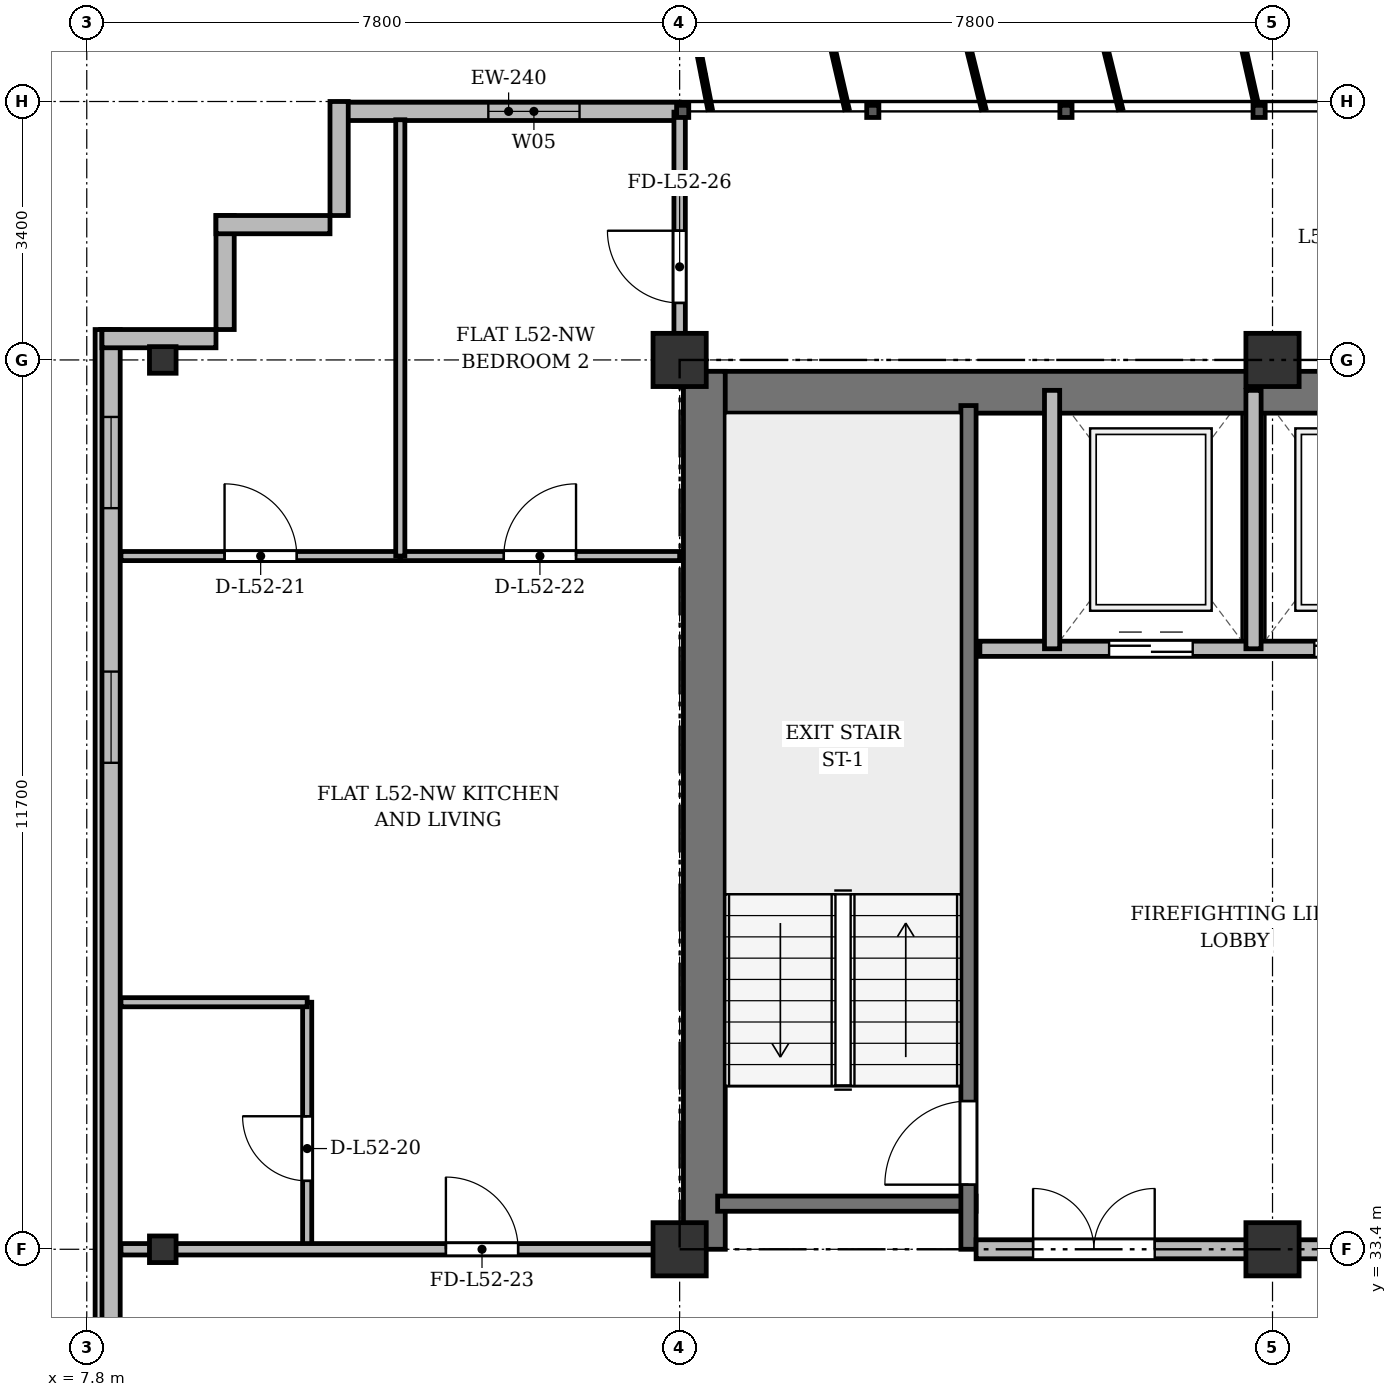
"""IFC4 building model, lengths in metres.
Left out: names, types, materials, properties, quantities, classifications, styles, units other than length and angle.
Written with IfcOpenShell. Run it as: python <this file> out.ifc"""

import sys

from ifc_helpers import new_model, si_unit, direction, frame, frame_2d, origin, origin_2d, place, context, subcontext, project, spatial, rectangle, i_section, extrude, source, transform, mapped, element, fill, save


model = new_model("IFC4")
c1 = context("Model", 3, precision=1e-05, world=origin(), true_north=direction((0.0, 1.0)))
c2 = subcontext(c1, "Body", "Model", "MODEL_VIEW")
j1 = project(units=[si_unit("LENGTHUNIT", "METRE"), si_unit("PLANEANGLEUNIT", "RADIAN")], contexts=[c1])
p1 = place(None, origin())
s1 = spatial("IfcSite", under=j1, at=p1, CompositionType="ELEMENT")
p2 = place(p1, origin())
s2 = spatial("IfcBuilding", under=s1, at=p2, CompositionType="ELEMENT")
p3 = place(p2, frame((0.0, 0.0, 201.3)))
s3 = spatial("IfcBuildingStorey", under=s2, at=p3, CompositionType="ELEMENT", Elevation=201.3)
m1 = source(origin(), c2, "Body", "SweptSolid", [
    extrude(i_section(OverallWidth=0.35, OverallDepth=0.35, WebThickness=0.018, FlangeThickness=0.028, at=origin_2d()), origin(), (0.0, 0.0, 1.0), 3.6),
])
for number, where, z_axis, x_axis in (
    (1, (8.8, 33.4, 0.0), (0.0, 0.0, 1.0), (1.0, 0.0, 0.0)),
    (2, (8.8, 45.1, 0.0), (0.0, 0.0, 1.0), (1.0, 0.0, 0.0)),
):
    element("IfcColumn", number, at=place(p3, frame(where, z_axis=z_axis, x_axis=x_axis)), inside=s3, PredefinedType="COLUMN", context=c2, shape_type="MappedRepresentation", body=[
        mapped(m1, transform((0.0, 0.0, 0.0), x_axis=(1.0, 0.0, 0.0), y_axis=(0.0, 1.0, 0.0), z_axis=(0.0, 0.0, 1.0), scale=1.0)),
    ])
m2 = source(origin(), c2, "Body", "SweptSolid", [
    extrude(rectangle(XDim=0.7, YDim=0.7, at=origin_2d()), origin(), (0.0, 0.0, 1.0), 3.6),
])
for number, where, z_axis, x_axis in (
    (3, (15.6, 33.4, 0.0), (0.0, 0.0, 1.0), (1.0, 0.0, 0.0)),
    (4, (15.6, 45.1, 0.0), (0.0, 0.0, 1.0), (1.0, 0.0, 0.0)),
    (5, (23.4, 33.4, 0.0), (0.0, 0.0, 1.0), (1.0, 0.0, 0.0)),
    (6, (23.4, 45.1, 0.0), (0.0, 0.0, 1.0), (1.0, 0.0, 0.0)),
):
    element("IfcColumn", number, at=place(p3, frame(where, z_axis=z_axis, x_axis=x_axis)), inside=s3, PredefinedType="COLUMN", context=c2, shape_type="MappedRepresentation", body=[
        mapped(m2, transform((0.0, 0.0, 0.0), x_axis=(1.0, 0.0, 0.0), y_axis=(0.0, 1.0, 0.0), z_axis=(0.0, 0.0, 1.0), scale=1.0)),
    ])
p4 = place(p3, frame((11.1, 48.37, 0.0), z_axis=(0.0, 0.0, 1.0), x_axis=(1.0, 0.0, 0.0)))
e7 = element("IfcWall", 7, at=p4, inside=s3, PredefinedType="SOLIDWALL", context=c2, shape_type="SweptSolid", body=[
    extrude(rectangle(XDim=4.5, YDim=0.24, at=frame_2d((2.25, 0.0))), origin(), (0.0, 0.0, 1.0), 3.22),
])
p5 = place(p4, frame((1.983, 0.0, 0.9)))
e8 = element("IfcOpeningElement", 8, at=p5, cuts=e7, PredefinedType="OPENING", context=c2, shape_type="SweptSolid", body=[
    extrude(rectangle(XDim=1.2, YDim=1.65, at=frame_2d((0.6, 0.825))), frame((0.0, 0.13, 0.0), z_axis=(0.0, -1.0, 0.0), x_axis=(1.0, 0.0, 0.0)), (0.0, 0.0, 1.0), 0.26),
])
p6 = place(p3, frame((8.12, 6.4, 0.0), z_axis=(0.0, 0.0, 1.0), x_axis=(0.0, 1.0, 0.0)))
e9 = element("IfcWall", 9, at=p6, inside=s3, PredefinedType="SOLIDWALL", context=c2, shape_type="SweptSolid", body=[
    extrude(rectangle(XDim=39.1, YDim=0.24, at=frame_2d((19.55, 0.0))), origin(), (0.0, 0.0, 1.0), 3.22),
])
p7 = place(p6, frame((1.45, 0.0, 0.92)))
e10 = element("IfcOpeningElement", 10, at=p7, cuts=e9, PredefinedType="OPENING", context=c2, shape_type="SweptSolid", body=[
    extrude(rectangle(XDim=1.2, YDim=1.65, at=frame_2d((0.6, 0.825))), frame((0.0, 0.13, 0.0), z_axis=(0.0, -1.0, 0.0), x_axis=(1.0, 0.0, 0.0)), (0.0, 0.0, 1.0), 0.26),
])
p8 = place(p6, frame((3.7, 0.0, 0.92)))
e11 = element("IfcOpeningElement", 11, at=p8, cuts=e9, PredefinedType="OPENING", context=c2, shape_type="SweptSolid", body=[
    extrude(rectangle(XDim=2.6, YDim=1.9, at=frame_2d((1.3, 0.95))), frame((0.0, 0.13, 0.0), z_axis=(0.0, -1.0, 0.0), x_axis=(1.0, 0.0, 0.0)), (0.0, 0.0, 1.0), 0.26),
])
p9 = place(p6, frame((7.9, 0.0, 0.92)))
e12 = element("IfcOpeningElement", 12, at=p9, cuts=e9, PredefinedType="OPENING", context=c2, shape_type="SweptSolid", body=[
    extrude(rectangle(XDim=2.6, YDim=1.9, at=frame_2d((1.3, 0.95))), frame((0.0, 0.13, 0.0), z_axis=(0.0, -1.0, 0.0), x_axis=(1.0, 0.0, 0.0)), (0.0, 0.0, 1.0), 0.26),
])
p10 = place(p6, frame((15.1, 0.0, 0.92)))
e13 = element("IfcOpeningElement", 13, at=p10, cuts=e9, PredefinedType="OPENING", context=c2, shape_type="SweptSolid", body=[
    extrude(rectangle(XDim=2.6, YDim=1.9, at=frame_2d((1.3, 0.95))), frame((0.0, 0.13, 0.0), z_axis=(0.0, -1.0, 0.0), x_axis=(1.0, 0.0, 0.0)), (0.0, 0.0, 1.0), 0.26),
])
p11 = place(p6, frame((33.4, 0.0, 0.92)))
e14 = element("IfcOpeningElement", 14, at=p11, cuts=e9, PredefinedType="OPENING", context=c2, shape_type="SweptSolid", body=[
    extrude(rectangle(XDim=1.2, YDim=1.65, at=frame_2d((0.6, 0.825))), frame((0.0, 0.13, 0.0), z_axis=(0.0, -1.0, 0.0), x_axis=(1.0, 0.0, 0.0)), (0.0, 0.0, 1.0), 0.26),
])
p12 = place(p6, frame((36.75, 0.0, 0.92)))
e15 = element("IfcOpeningElement", 15, at=p12, cuts=e9, PredefinedType="OPENING", context=c2, shape_type="SweptSolid", body=[
    extrude(rectangle(XDim=1.2, YDim=1.65, at=frame_2d((0.6, 0.825))), frame((0.0, 0.13, 0.0), z_axis=(0.0, -1.0, 0.0), x_axis=(1.0, 0.0, 0.0)), (0.0, 0.0, 1.0), 0.26),
])
for number, where, z_axis, x_axis in (
    (16, (8.0, 45.38, 0.0), (0.0, 0.0, 1.0), (1.0, 0.0, 0.0)),
    (17, (9.62, 45.5, 0.0), (0.0, 0.0, 1.0), (0.0, 1.0, 0.0)),
    (18, (9.5, 46.88, 0.0), (0.0, 0.0, 1.0), (1.0, 0.0, 0.0)),
    (19, (11.12, 47.0, 0.0), (0.0, 0.0, 1.0), (0.0, 1.0, 0.0)),
):
    element("IfcWall", number, at=place(p3, frame(where, z_axis=z_axis, x_axis=x_axis)), inside=s3, PredefinedType="SOLIDWALL", context=c2, shape_type="SweptSolid", body=[
        extrude(rectangle(XDim=1.5, YDim=0.24, at=frame_2d((0.75, 0.0))), origin(), (0.0, 0.0, 1.0), 3.22),
    ])
p13 = place(p3, frame((15.65, 44.675, 0.0), z_axis=(0.0, 0.0, 1.0), x_axis=(1.0, 0.0, 0.0)))
e20 = element("IfcWall", 20, at=p13, inside=s3, PredefinedType="SHEAR", context=c2, shape_type="SweptSolid", body=[
    extrude(rectangle(XDim=43.1, YDim=0.55, at=frame_2d((21.55, 0.0))), origin(), (0.0, 0.0, 1.0), 3.22),
])
p14 = place(p3, frame((15.925, 33.4, 0.0), z_axis=(0.0, 0.0, 1.0), x_axis=(0.0, 1.0, 0.0)))
e21 = element("IfcWall", 21, at=p14, inside=s3, PredefinedType="SHEAR", context=c2, shape_type="SweptSolid", body=[
    extrude(rectangle(XDim=11.55, YDim=0.55, at=frame_2d((5.775, 0.0))), origin(), (0.0, 0.0, 1.0), 3.22),
])
p15 = place(p3, frame((16.1, 34.0, 0.0), z_axis=(0.0, 0.0, 1.0), x_axis=(1.0, 0.0, 0.0)))
e22 = element("IfcWall", 22, at=p15, inside=s3, PredefinedType="SHEAR", context=c2, shape_type="SweptSolid", body=[
    extrude(rectangle(XDim=3.4, YDim=0.2, at=frame_2d((1.7, 0.0))), origin(), (0.0, 0.0, 1.0), 3.22),
])
p16 = place(p3, frame((19.4, 33.4, 0.0), z_axis=(0.0, 0.0, 1.0), x_axis=(0.0, 1.0, 0.0)))
e23 = element("IfcWall", 23, at=p16, inside=s3, PredefinedType="SHEAR", context=c2, shape_type="SweptSolid", body=[
    extrude(rectangle(XDim=11.1, YDim=0.2, at=frame_2d((5.55, 0.0))), origin(), (0.0, 0.0, 1.0), 3.22),
])
p17 = place(p16, frame((0.85, 0.0, 0.0)))
e24 = element("IfcOpeningElement", 24, at=p17, cuts=e23, PredefinedType="OPENING", context=c2, shape_type="SweptSolid", body=[
    extrude(rectangle(XDim=1.1, YDim=2.15, at=frame_2d((0.55, 1.075))), frame((0.0, 0.11, 0.0), z_axis=(0.0, -1.0, 0.0), x_axis=(1.0, 0.0, 0.0)), (0.0, 0.0, 1.0), 0.22),
])
p18 = place(p3, frame((19.55, 41.3, 0.0), z_axis=(0.0, 0.0, 1.0), x_axis=(1.0, 0.0, 0.0)))
e25 = element("IfcWall", 25, at=p18, inside=s3, PredefinedType="SOLIDWALL", context=c2, shape_type="SweptSolid", body=[
    extrude(rectangle(XDim=6.75, YDim=0.2, at=frame_2d((3.375, 0.0))), origin(), (0.0, 0.0, 1.0), 3.22),
])
p19 = place(p18, frame((1.7, 0.0, 0.0)))
e26 = element("IfcOpeningElement", 26, at=p19, cuts=e25, PredefinedType="OPENING", context=c2, shape_type="SweptSolid", body=[
    extrude(rectangle(XDim=1.1, YDim=2.15, at=frame_2d((0.55, 1.075))), frame((0.0, 0.11, 0.0), z_axis=(0.0, -1.0, 0.0), x_axis=(1.0, 0.0, 0.0)), (0.0, 0.0, 1.0), 0.22),
])
p20 = place(p18, frame((4.4, 0.0, 0.0)))
e27 = element("IfcOpeningElement", 27, at=p20, cuts=e25, PredefinedType="OPENING", context=c2, shape_type="SweptSolid", body=[
    extrude(rectangle(XDim=1.1, YDim=2.15, at=frame_2d((0.55, 1.075))), frame((0.0, 0.11, 0.0), z_axis=(0.0, -1.0, 0.0), x_axis=(1.0, 0.0, 0.0)), (0.0, 0.0, 1.0), 0.22),
])
for number, where, z_axis, x_axis in (
    (28, (20.5, 41.3, 0.0), (0.0, 0.0, 1.0), (0.0, 1.0, 0.0)),
    (29, (23.15, 41.3, 0.0), (0.0, 0.0, 1.0), (0.0, 1.0, 0.0)),
):
    element("IfcWall", number, at=place(p3, frame(where, z_axis=z_axis, x_axis=x_axis)), inside=s3, PredefinedType="SOLIDWALL", context=c2, shape_type="SweptSolid", body=[
        extrude(rectangle(XDim=3.4, YDim=0.2, at=frame_2d((1.7, 0.0))), origin(), (0.0, 0.0, 1.0), 3.22),
    ])
p21 = place(p3, frame((19.5, 33.4, 0.0), z_axis=(0.0, 0.0, 1.0), x_axis=(1.0, 0.0, 0.0)))
e30 = element("IfcWall", 30, at=p21, inside=s3, PredefinedType="PARTITIONING", context=c2, shape_type="SweptSolid", body=[
    extrude(rectangle(XDim=6.8, YDim=0.25, at=frame_2d((3.4, 0.0))), origin(), (0.0, 0.0, 1.0), 2.77),
])
p22 = place(p21, frame((0.75, 0.0, 0.0)))
e31 = element("IfcOpeningElement", 31, at=p22, cuts=e30, PredefinedType="OPENING", context=c2, shape_type="SweptSolid", body=[
    extrude(rectangle(XDim=1.6, YDim=2.2, at=frame_2d((0.8, 1.1))), frame((0.0, 0.135, 0.0), z_axis=(0.0, -1.0, 0.0), x_axis=(1.0, 0.0, 0.0)), (0.0, 0.0, 1.0), 0.27),
])
p23 = place(p3, frame((10.7, 33.4, 0.0), z_axis=(0.0, 0.0, 1.0), x_axis=(0.0, 1.0, 0.0)))
e32 = element("IfcWall", 32, at=p23, inside=s3, PredefinedType="PARTITIONING", context=c2, shape_type="SweptSolid", body=[
    extrude(rectangle(XDim=3.25, YDim=0.12, at=frame_2d((1.625, 0.0))), origin(), (0.0, 0.0, 1.0), 2.77),
])
p24 = place(p23, frame((0.9, 0.0, 0.0)))
e33 = element("IfcOpeningElement", 33, at=p24, cuts=e32, PredefinedType="OPENING", context=c2, shape_type="SweptSolid", body=[
    extrude(rectangle(XDim=0.85, YDim=2.1, at=frame_2d((0.425, 1.05))), frame((0.0, 0.07, 0.0), z_axis=(0.0, -1.0, 0.0), x_axis=(1.0, 0.0, 0.0)), (0.0, 0.0, 1.0), 0.14),
])
p25 = place(p3, frame((8.25, 36.65, 0.0), z_axis=(0.0, 0.0, 1.0), x_axis=(1.0, 0.0, 0.0)))
e34 = element("IfcWall", 34, at=p25, inside=s3, PredefinedType="PARTITIONING", context=c2, shape_type="SweptSolid", body=[
    extrude(rectangle(XDim=2.45, YDim=0.12, at=frame_2d((1.225, 0.0))), origin(), (0.0, 0.0, 1.0), 2.72),
])
p26 = place(p3, frame((8.25, 42.52, 0.0), z_axis=(0.0, 0.0, 1.0), x_axis=(1.0, 0.0, 0.0)))
e35 = element("IfcWall", 35, at=p26, inside=s3, PredefinedType="PARTITIONING", context=c2, shape_type="SweptSolid", body=[
    extrude(rectangle(XDim=3.675, YDim=0.12, at=frame_2d((1.837, 0.0))), origin(), (0.0, 0.0, 1.0), 2.72),
])
p27 = place(p26, frame((1.363, 0.0, 0.0)))
e36 = element("IfcOpeningElement", 36, at=p27, cuts=e35, PredefinedType="OPENING", context=c2, shape_type="SweptSolid", body=[
    extrude(rectangle(XDim=0.95, YDim=2.15, at=frame_2d((0.475, 1.075))), frame((0.0, 0.07, 0.0), z_axis=(0.0, -1.0, 0.0), x_axis=(1.0, 0.0, 0.0)), (0.0, 0.0, 1.0), 0.14),
])
p28 = place(p3, frame((11.925, 42.52, 0.0), z_axis=(0.0, 0.0, 1.0), x_axis=(1.0, 0.0, 0.0)))
e37 = element("IfcWall", 37, at=p28, inside=s3, PredefinedType="PARTITIONING", context=c2, shape_type="SweptSolid", body=[
    extrude(rectangle(XDim=3.675, YDim=0.12, at=frame_2d((1.837, 0.0))), origin(), (0.0, 0.0, 1.0), 2.72),
])
p29 = place(p28, frame((1.362, 0.0, 0.0)))
e38 = element("IfcOpeningElement", 38, at=p29, cuts=e37, PredefinedType="OPENING", context=c2, shape_type="SweptSolid", body=[
    extrude(rectangle(XDim=0.95, YDim=2.15, at=frame_2d((0.475, 1.075))), frame((0.0, 0.07, 0.0), z_axis=(0.0, -1.0, 0.0), x_axis=(1.0, 0.0, 0.0)), (0.0, 0.0, 1.0), 0.14),
])
p30 = place(p3, frame((11.925, 42.52, 0.0), z_axis=(0.0, 0.0, 1.0), x_axis=(0.0, 1.0, 0.0)))
e39 = element("IfcWall", 39, at=p30, inside=s3, PredefinedType="PARTITIONING", context=c2, shape_type="SweptSolid", body=[
    extrude(rectangle(XDim=5.74, YDim=0.12, at=frame_2d((2.87, 0.0))), origin(), (0.0, 0.0, 1.0), 2.77),
])
p31 = place(p3, frame((8.25, 33.4, 0.0), z_axis=(0.0, 0.0, 1.0), x_axis=(1.0, 0.0, 0.0)))
e40 = element("IfcWall", 40, at=p31, inside=s3, PredefinedType="PARTITIONING", context=c2, shape_type="SweptSolid", body=[
    extrude(rectangle(XDim=7.35, YDim=0.15, at=frame_2d((3.675, 0.0))), origin(), (0.0, 0.0, 1.0), 2.77),
])
p32 = place(p31, frame((4.275, 0.0, 0.0)))
e41 = element("IfcOpeningElement", 41, at=p32, cuts=e40, PredefinedType="OPENING", context=c2, shape_type="SweptSolid", body=[
    extrude(rectangle(XDim=0.95, YDim=2.15, at=frame_2d((0.475, 1.075))), frame((0.0, 0.085, 0.0), z_axis=(0.0, -1.0, 0.0), x_axis=(1.0, 0.0, 0.0)), (0.0, 0.0, 1.0), 0.17),
])
p33 = place(p3, frame((15.6, 44.75, 0.0), z_axis=(0.0, 0.0, 1.0), x_axis=(0.0, 1.0, 0.0)))
e42 = element("IfcWall", 42, at=p33, inside=s3, PredefinedType="PARTITIONING", context=c2, shape_type="SweptSolid", body=[
    extrude(rectangle(XDim=3.61, YDim=0.15, at=frame_2d((1.805, 0.0))), origin(), (0.0, 0.0, 1.0), 2.72),
])
p34 = place(p33, frame((1.1, 0.0, 0.0)))
e43 = element("IfcOpeningElement", 43, at=p34, cuts=e42, PredefinedType="OPENING", context=c2, shape_type="SweptSolid", body=[
    extrude(rectangle(XDim=0.95, YDim=2.15, at=frame_2d((0.475, 1.075))), frame((0.0, 0.085, 0.0), z_axis=(0.0, -1.0, 0.0), x_axis=(1.0, 0.0, 0.0)), (0.0, 0.0, 1.0), 0.17),
])
m3 = source(origin(), c2, "Body", "SweptSolid", [
    extrude(rectangle(XDim=1.2, YDim=1.65, at=frame_2d((0.6, 0.825))), frame((0.0, 0.03, 0.0), z_axis=(0.0, -1.0, 0.0), x_axis=(1.0, 0.0, 0.0)), (0.0, 0.0, 1.0), 0.06),
])
p35 = place(p5, origin())
e44 = element("IfcWindow", 44, at=p35, inside=s3, PartitioningType="SINGLE_PANEL", PredefinedType="WINDOW", context=c2, shape_type="MappedRepresentation", body=[
    mapped(m3, transform((0.0, 0.0, 0.0), x_axis=(1.0, 0.0, 0.0), y_axis=(0.0, 1.0, 0.0), z_axis=(0.0, 0.0, 1.0), scale=1.0)),
])
fill(e8, e44)
p36 = place(p11, origin())
e45 = element("IfcWindow", 45, at=p36, inside=s3, PartitioningType="SINGLE_PANEL", PredefinedType="WINDOW", context=c2, shape_type="MappedRepresentation", body=[
    mapped(m3, transform((0.0, 0.0, 0.0), x_axis=(1.0, 0.0, 0.0), y_axis=(0.0, 1.0, 0.0), z_axis=(0.0, 0.0, 1.0), scale=1.0)),
])
fill(e14, e45)
p37 = place(p12, origin())
e46 = element("IfcWindow", 46, at=p37, inside=s3, PartitioningType="SINGLE_PANEL", PredefinedType="WINDOW", context=c2, shape_type="MappedRepresentation", body=[
    mapped(m3, transform((0.0, 0.0, 0.0), x_axis=(1.0, 0.0, 0.0), y_axis=(0.0, 1.0, 0.0), z_axis=(0.0, 0.0, 1.0), scale=1.0)),
])
fill(e15, e46)
m4 = source(origin(), c2, "Body", "SweptSolid", [
    extrude(rectangle(XDim=1.1, YDim=2.15, at=frame_2d((0.55, 1.075))), frame((0.0, 0.025, 0.0), z_axis=(0.0, -1.0, 0.0), x_axis=(1.0, 0.0, 0.0)), (0.0, 0.0, 1.0), 0.05),
])
p38 = place(p17, origin())
e47 = element("IfcDoor", 47, at=p38, inside=s3, OperationType="SINGLE_SWING_LEFT", PredefinedType="DOOR", context=c2, shape_type="MappedRepresentation", body=[
    mapped(m4, transform((0.0, 0.0, 0.0), x_axis=(1.0, 0.0, 0.0), y_axis=(0.0, 1.0, 0.0), z_axis=(0.0, 0.0, 1.0), scale=1.0)),
])
fill(e24, e47)
p39 = place(p19, origin())
e48 = element("IfcDoor", 48, at=p39, inside=s3, OperationType="DOUBLE_DOOR_SLIDING", PredefinedType="DOOR", context=c2, shape_type="MappedRepresentation", body=[
    mapped(m4, transform((0.0, 0.0, 0.0), x_axis=(1.0, 0.0, 0.0), y_axis=(0.0, 1.0, 0.0), z_axis=(0.0, 0.0, 1.0), scale=1.0)),
])
fill(e26, e48)
p40 = place(p20, origin())
e49 = element("IfcDoor", 49, at=p40, inside=s3, OperationType="DOUBLE_DOOR_SLIDING", PredefinedType="DOOR", context=c2, shape_type="MappedRepresentation", body=[
    mapped(m4, transform((0.0, 0.0, 0.0), x_axis=(1.0, 0.0, 0.0), y_axis=(0.0, 1.0, 0.0), z_axis=(0.0, 0.0, 1.0), scale=1.0)),
])
fill(e27, e49)
m5 = source(origin(), c2, "Body", "SweptSolid", [
    extrude(rectangle(XDim=1.6, YDim=2.2, at=frame_2d((0.8, 1.1))), frame((0.0, 0.025, 0.0), z_axis=(0.0, -1.0, 0.0), x_axis=(1.0, 0.0, 0.0)), (0.0, 0.0, 1.0), 0.05),
])
p41 = place(p22, origin())
e50 = element("IfcDoor", 50, at=p41, inside=s3, OperationType="DOUBLE_DOOR_SINGLE_SWING", PredefinedType="DOOR", context=c2, shape_type="MappedRepresentation", body=[
    mapped(m5, transform((0.0, 0.0, 0.0), x_axis=(1.0, 0.0, 0.0), y_axis=(0.0, 1.0, 0.0), z_axis=(0.0, 0.0, 1.0), scale=1.0)),
])
fill(e31, e50)
m6 = source(origin(), c2, "Body", "SweptSolid", [
    extrude(rectangle(XDim=0.85, YDim=2.1, at=frame_2d((0.425, 1.05))), frame((0.0, 0.025, 0.0), z_axis=(0.0, -1.0, 0.0), x_axis=(1.0, 0.0, 0.0)), (0.0, 0.0, 1.0), 0.05),
])
p42 = place(p24, origin())
e51 = element("IfcDoor", 51, at=p42, inside=s3, OperationType="SINGLE_SWING_RIGHT", PredefinedType="DOOR", context=c2, shape_type="MappedRepresentation", body=[
    mapped(m6, transform((0.0, 0.0, 0.0), x_axis=(1.0, 0.0, 0.0), y_axis=(0.0, 1.0, 0.0), z_axis=(0.0, 0.0, 1.0), scale=1.0)),
])
fill(e33, e51)
m7 = source(origin(), c2, "Body", "SweptSolid", [
    extrude(rectangle(XDim=0.95, YDim=2.15, at=frame_2d((0.475, 1.075))), frame((0.0, 0.025, 0.0), z_axis=(0.0, -1.0, 0.0), x_axis=(1.0, 0.0, 0.0)), (0.0, 0.0, 1.0), 0.05),
])
p43 = place(p27, origin())
e52 = element("IfcDoor", 52, at=p43, inside=s3, OperationType="SINGLE_SWING_LEFT", PredefinedType="DOOR", context=c2, shape_type="MappedRepresentation", body=[
    mapped(m7, transform((0.0, 0.0, 0.0), x_axis=(1.0, 0.0, 0.0), y_axis=(0.0, 1.0, 0.0), z_axis=(0.0, 0.0, 1.0), scale=1.0)),
])
fill(e36, e52)
p44 = place(p29, origin())
e53 = element("IfcDoor", 53, at=p44, inside=s3, OperationType="SINGLE_SWING_RIGHT", PredefinedType="DOOR", context=c2, shape_type="MappedRepresentation", body=[
    mapped(m7, transform((0.0, 0.0, 0.0), x_axis=(1.0, 0.0, 0.0), y_axis=(0.0, 1.0, 0.0), z_axis=(0.0, 0.0, 1.0), scale=1.0)),
])
fill(e38, e53)
p45 = place(p32, origin())
e54 = element("IfcDoor", 54, at=p45, inside=s3, OperationType="SINGLE_SWING_LEFT", PredefinedType="DOOR", context=c2, shape_type="MappedRepresentation", body=[
    mapped(m7, transform((0.0, 0.0, 0.0), x_axis=(1.0, 0.0, 0.0), y_axis=(0.0, 1.0, 0.0), z_axis=(0.0, 0.0, 1.0), scale=1.0)),
])
fill(e41, e54)
p46 = place(p34, origin())
e55 = element("IfcDoor", 55, at=p46, inside=s3, OperationType="SINGLE_SWING_RIGHT", PredefinedType="DOOR", context=c2, shape_type="MappedRepresentation", body=[
    mapped(m7, transform((0.0, 0.0, 0.0), x_axis=(1.0, 0.0, 0.0), y_axis=(0.0, 1.0, 0.0), z_axis=(0.0, 0.0, 1.0), scale=1.0)),
])
fill(e43, e55)
save(model, sys.argv[1])
